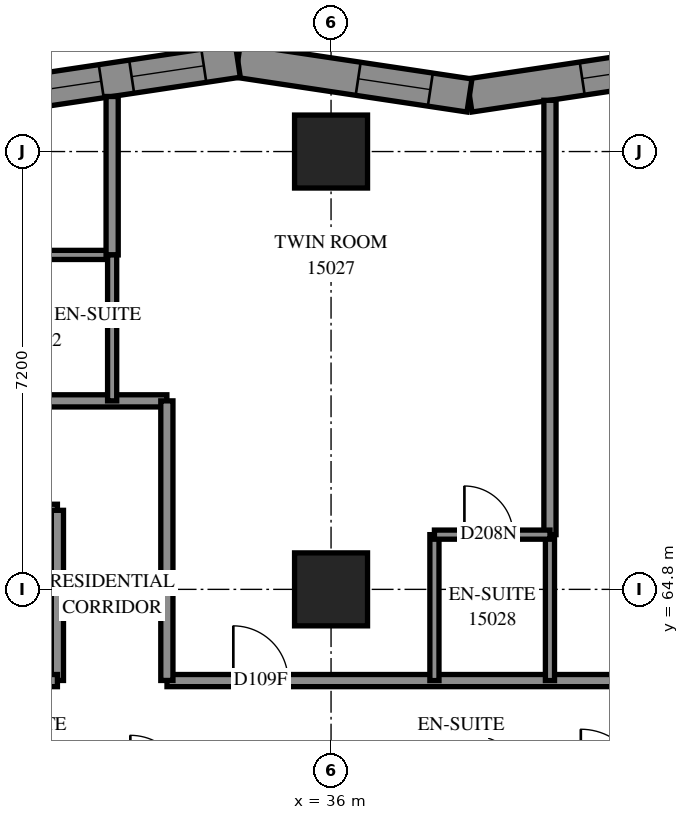
"""IFC4 building model, lengths in metres.
Left out: names, types, materials, properties, quantities, classifications, styles, units other than length and angle.
Written with IfcOpenShell. Run it as: python <this file> out.ifc"""

import sys

from ifc_helpers import new_model, si_unit, direction, frame, frame_2d, origin, origin_2d, place, context, subcontext, project, spatial, polyline, rectangle, outline, extrude, element, fill, save


model = new_model("IFC4")
c1 = context("Model", 3, precision=1e-05, world=origin(), true_north=direction((0.0, 1.0)))
c2 = subcontext(c1, "Body", "Model", "MODEL_VIEW")
j1 = project(units=[si_unit("LENGTHUNIT", "METRE"), si_unit("PLANEANGLEUNIT", "RADIAN")], contexts=[c1])
p1 = place(None, origin())
s1 = spatial("IfcSite", under=j1, at=p1, CompositionType="ELEMENT")
p2 = place(p1, origin())
s2 = spatial("IfcBuilding", under=s1, at=p2, CompositionType="ELEMENT")
p3 = place(p2, frame((0.0, 0.0, 57.6)))
s3 = spatial("IfcBuildingStorey", under=s2, at=p3, CompositionType="ELEMENT", Elevation=57.6)
for number, where, z_axis, x_axis in (
    (1, (36.0, 64.8, 0.0), (0.0, 0.0, 1.0), (1.0, 0.0, 0.0)),
    (2, (36.0, 72.0, 0.0), (0.0, 0.0, 1.0), (1.0, 0.0, 0.0)),
):
    element("IfcColumn", number, at=place(p3, frame(where, z_axis=z_axis, x_axis=x_axis)), inside=s3, PredefinedType="COLUMN", context=c2, shape_type="SweptSolid", body=[
        extrude(rectangle(XDim=1.2, YDim=1.2, at=origin_2d()), origin(), (0.0, 0.0, 1.0), 3.1),
    ])
p4 = place(p3, frame((42.086, 73.494, 0.0), z_axis=(0.0, 0.0, 1.0), x_axis=(-0.9889155896, -0.1484788086, 0.0)))
e3 = element("IfcWall", 3, at=p4, inside=s3, PredefinedType="SOLIDWALL", context=c2, shape_type="SweptSolid", body=[
    extrude(outline(polyline([(-0.041, -0.275), (3.811, -0.275), (3.894, 0.275), (0.041, 0.275), (-0.041, -0.275)])), origin(), (0.0, 0.0, 1.0), 3.1),
])
p5 = place(p4, frame((0.778, 0.0, 0.5)))
e4 = element("IfcOpeningElement", 4, at=p5, cuts=e3, PredefinedType="OPENING", context=c2, shape_type="SweptSolid", body=[
    extrude(rectangle(XDim=1.2, YDim=2.45, at=frame_2d((0.6, 1.225))), frame((0.0, 0.285, 0.0), z_axis=(0.0, -1.0, 0.0), x_axis=(1.0, 0.0, 0.0)), (0.0, 0.0, 1.0), 0.57),
])
p6 = place(p3, frame((38.276, 72.922, 0.0), z_axis=(0.0, 0.0, 1.0), x_axis=(-0.9889155896, 0.1484788086, 0.0)))
e5 = element("IfcWall", 5, at=p6, inside=s3, PredefinedType="SOLIDWALL", context=c2, shape_type="SweptSolid", body=[
    extrude(outline(polyline([(0.041, -0.275), (3.894, -0.275), (3.811, 0.275), (-0.041, 0.275), (0.041, -0.275)])), origin(), (0.0, 0.0, 1.0), 3.1),
])
p7 = place(p6, frame((0.651, 0.0, 0.5)))
e6 = element("IfcOpeningElement", 6, at=p7, cuts=e5, PredefinedType="OPENING", context=c2, shape_type="SweptSolid", body=[
    extrude(rectangle(XDim=1.2, YDim=2.45, at=frame_2d((0.6, 1.225))), frame((0.0, 0.285, 0.0), z_axis=(0.0, -1.0, 0.0), x_axis=(1.0, 0.0, 0.0)), (0.0, 0.0, 1.0), 0.57),
])
p8 = place(p3, frame((34.467, 73.494, 0.0), z_axis=(0.0, 0.0, 1.0), x_axis=(-0.9889150173, -0.1484826202, 0.0)))
e7 = element("IfcWall", 7, at=p8, inside=s3, PredefinedType="SOLIDWALL", context=c2, shape_type="SweptSolid", body=[
    extrude(outline(polyline([(-0.041, -0.275), (3.811, -0.275), (3.894, 0.275), (0.041, 0.275), (-0.041, -0.275)])), origin(), (0.0, 0.0, 1.0), 3.1),
])
p9 = place(p8, frame((0.566, 0.0, 0.5)))
e8 = element("IfcOpeningElement", 8, at=p9, cuts=e7, PredefinedType="OPENING", context=c2, shape_type="SweptSolid", body=[
    extrude(rectangle(XDim=1.2, YDim=2.45, at=frame_2d((0.6, 1.225))), frame((0.0, 0.285, 0.0), z_axis=(0.0, -1.0, 0.0), x_axis=(1.0, 0.0, 0.0)), (0.0, 0.0, 1.0), 0.57),
])
p10 = place(p8, frame((2.271, 0.0, 0.5)))
e9 = element("IfcOpeningElement", 9, at=p10, cuts=e7, PredefinedType="OPENING", context=c2, shape_type="SweptSolid", body=[
    extrude(rectangle(XDim=1.2, YDim=2.45, at=frame_2d((0.6, 1.225))), frame((0.0, 0.285, 0.0), z_axis=(0.0, -1.0, 0.0), x_axis=(1.0, 0.0, 0.0)), (0.0, 0.0, 1.0), 0.57),
])
p11 = place(p3, frame((33.302, 63.3, 0.0), z_axis=(0.0, 0.0, 1.0), x_axis=(1.0, 0.0, 0.0)))
e10 = element("IfcWall", 10, at=p11, inside=s3, PredefinedType="PARTITIONING", context=c2, shape_type="SweptSolid", body=[
    extrude(rectangle(XDim=21.798, YDim=0.2, at=frame_2d((10.899, 0.0))), origin(), (0.0, 0.0, 1.0), 3.1),
])
p12 = place(p11, frame((1.091, 0.0, 0.0)))
e11 = element("IfcOpeningElement", 11, at=p12, cuts=e10, PredefinedType="OPENING", context=c2, shape_type="SweptSolid", body=[
    extrude(rectangle(XDim=0.9, YDim=2.1, at=frame_2d((0.45, 1.05))), frame((0.0, 0.11, 0.0), z_axis=(0.0, -1.0, 0.0), x_axis=(1.0, 0.0, 0.0)), (0.0, 0.0, 1.0), 0.22),
])
p13 = place(p11, frame((8.248, 0.0, 0.0)))
e12 = element("IfcOpeningElement", 12, at=p13, cuts=e10, PredefinedType="OPENING", context=c2, shape_type="SweptSolid", body=[
    extrude(rectangle(XDim=0.9, YDim=2.1, at=frame_2d((0.45, 1.05))), frame((0.0, 0.11, 0.0), z_axis=(0.0, -1.0, 0.0), x_axis=(1.0, 0.0, 0.0)), (0.0, 0.0, 1.0), 0.22),
])
p14 = place(p11, frame((15.448, 0.0, 0.0)))
e13 = element("IfcOpeningElement", 13, at=p14, cuts=e10, PredefinedType="OPENING", context=c2, shape_type="SweptSolid", body=[
    extrude(rectangle(XDim=0.9, YDim=2.1, at=frame_2d((0.45, 1.05))), frame((0.0, 0.11, 0.0), z_axis=(0.0, -1.0, 0.0), x_axis=(1.0, 0.0, 0.0)), (0.0, 0.0, 1.0), 0.22),
])
p15 = place(p3, frame((21.602, 67.9, 0.0), z_axis=(0.0, 0.0, 1.0), x_axis=(1.0, 0.0, 0.0)))
e14 = element("IfcWall", 14, at=p15, inside=s3, PredefinedType="PARTITIONING", context=c2, shape_type="SweptSolid", body=[
    extrude(rectangle(XDim=11.698, YDim=0.2, at=frame_2d((5.849, 0.0))), origin(), (0.0, 0.0, 1.0), 3.1),
])
p16 = place(p15, frame((5.955, 0.0, 0.0)))
e15 = element("IfcOpeningElement", 15, at=p16, cuts=e14, PredefinedType="OPENING", context=c2, shape_type="SweptSolid", body=[
    extrude(rectangle(XDim=0.9, YDim=2.1, at=frame_2d((0.45, 1.05))), frame((0.0, 0.11, 0.0), z_axis=(0.0, -1.0, 0.0), x_axis=(1.0, 0.0, 0.0)), (0.0, 0.0, 1.0), 0.22),
])
p17 = place(p3, frame((21.6, 66.1, 0.0), z_axis=(0.0, 0.0, 1.0), x_axis=(1.0, 0.0, 0.0)))
e16 = element("IfcWall", 16, at=p17, inside=s3, PredefinedType="PARTITIONING", context=c2, shape_type="SweptSolid", body=[
    extrude(rectangle(XDim=9.9, YDim=0.2, at=frame_2d((4.95, 0.0))), origin(), (0.0, 0.0, 1.0), 3.1),
])
p18 = place(p17, frame((5.314, 0.0, 0.0)))
e17 = element("IfcOpeningElement", 17, at=p18, cuts=e16, PredefinedType="OPENING", context=c2, shape_type="SweptSolid", body=[
    extrude(rectangle(XDim=1.0, YDim=2.1, at=frame_2d((0.5, 1.05))), frame((0.0, 0.11, 0.0), z_axis=(0.0, -1.0, 0.0), x_axis=(1.0, 0.0, 0.0)), (0.0, 0.0, 1.0), 0.22),
])
p19 = place(p3, frame((39.6, 65.7, 0.0), z_axis=(0.0, 0.0, 1.0), x_axis=(0.0, 1.0, 0.0)))
e18 = element("IfcWall", 18, at=p19, inside=s3, PredefinedType="PARTITIONING", context=c2, shape_type="SweptSolid", body=[
    extrude(rectangle(XDim=7.143, YDim=0.2, at=frame_2d((3.571, 0.0))), origin(), (0.0, 0.0, 1.0), 3.1),
])
p20 = place(p3, frame((33.3, 63.302, 0.0), z_axis=(0.0, 0.0, 1.0), x_axis=(0.0, 1.0, 0.0)))
e19 = element("IfcWall", 19, at=p20, inside=s3, PredefinedType="PARTITIONING", context=c2, shape_type="SweptSolid", body=[
    extrude(rectangle(XDim=4.598, YDim=0.2, at=frame_2d((2.299, 0.0))), origin(), (0.0, 0.0, 1.0), 3.1),
])
p21 = place(p3, frame((29.2, 70.3, 0.0), z_axis=(0.0, 0.0, 1.0), x_axis=(1.0, 0.0, 0.0)))
e20 = element("IfcWall", 20, at=p21, inside=s3, PredefinedType="PARTITIONING", context=c2, shape_type="SweptSolid", body=[
    extrude(rectangle(XDim=3.2, YDim=0.15, at=frame_2d((1.6, 0.0))), origin(), (0.0, 0.0, 1.0), 3.1),
])
p22 = place(p21, frame((1.204, 0.0, 0.0)))
e21 = element("IfcOpeningElement", 21, at=p22, cuts=e20, PredefinedType="OPENING", context=c2, shape_type="SweptSolid", body=[
    extrude(rectangle(XDim=0.8, YDim=2.1, at=frame_2d((0.4, 1.05))), frame((0.0, 0.085, 0.0), z_axis=(0.0, -1.0, 0.0), x_axis=(1.0, 0.0, 0.0)), (0.0, 0.0, 1.0), 0.17),
])
p23 = place(p3, frame((31.5, 63.302, 0.0), z_axis=(0.0, 0.0, 1.0), x_axis=(0.0, 1.0, 0.0)))
e22 = element("IfcWall", 22, at=p23, inside=s3, PredefinedType="PARTITIONING", context=c2, shape_type="SweptSolid", body=[
    extrude(rectangle(XDim=2.798, YDim=0.2, at=frame_2d((1.399, 0.0))), origin(), (0.0, 0.0, 1.0), 3.1),
])
p24 = place(p3, frame((28.802, 63.3, 0.0), z_axis=(0.0, 0.0, 1.0), x_axis=(1.0, 0.0, 0.0)))
e23 = element("IfcWall", 23, at=p24, inside=s3, PredefinedType="PARTITIONING", context=c2, shape_type="SweptSolid", body=[
    extrude(rectangle(XDim=2.698, YDim=0.2, at=frame_2d((1.349, 0.0))), origin(), (0.0, 0.0, 1.0), 3.1),
])
p25 = place(p3, frame((32.4, 70.3, 0.0), z_axis=(0.0, 0.0, 1.0), x_axis=(0.0, 1.0, 0.0)))
e24 = element("IfcWall", 24, at=p25, inside=s3, PredefinedType="PARTITIONING", context=c2, shape_type="SweptSolid", body=[
    extrude(rectangle(XDim=2.606, YDim=0.2, at=frame_2d((1.303, 0.0))), origin(), (0.0, 0.0, 1.0), 3.1),
])
for number, where, z_axis, x_axis in (
    (25, (37.7, 63.3, 0.0), (0.0, 0.0, 1.0), (0.0, 1.0, 0.0)),
    (26, (39.6, 63.3, 0.0), (0.0, 0.0, 1.0), (0.0, 1.0, 0.0)),
    (27, (32.4, 67.9, 0.0), (0.0, 0.0, 1.0), (0.0, 1.0, 0.0)),
):
    element("IfcWall", number, at=place(p3, frame(where, z_axis=z_axis, x_axis=x_axis)), inside=s3, PredefinedType="PARTITIONING", context=c2, shape_type="SweptSolid", body=[
        extrude(rectangle(XDim=2.4, YDim=0.15, at=frame_2d((1.2, 0.0))), origin(), (0.0, 0.0, 1.0), 3.1),
    ])
p26 = place(p3, frame((37.7, 65.7, 0.0), z_axis=(0.0, 0.0, 1.0), x_axis=(1.0, 0.0, 0.0)))
e28 = element("IfcWall", 28, at=p26, inside=s3, PredefinedType="PARTITIONING", context=c2, shape_type="SweptSolid", body=[
    extrude(rectangle(XDim=1.9, YDim=0.15, at=frame_2d((0.95, 0.0))), origin(), (0.0, 0.0, 1.0), 3.1),
])
p27 = place(p26, frame((0.493, 0.0, 0.0)))
e29 = element("IfcOpeningElement", 29, at=p27, cuts=e28, PredefinedType="OPENING", context=c2, shape_type="SweptSolid", body=[
    extrude(rectangle(XDim=0.8, YDim=2.1, at=frame_2d((0.4, 1.05))), frame((0.0, 0.085, 0.0), z_axis=(0.0, -1.0, 0.0), x_axis=(1.0, 0.0, 0.0)), (0.0, 0.0, 1.0), 0.17),
])
p28 = place(p5, origin())
e30 = element("IfcWindow", 30, at=p28, inside=s3, PartitioningType="SINGLE_PANEL", PredefinedType="WINDOW", context=c2, shape_type="SweptSolid", body=[
    extrude(rectangle(XDim=1.2, YDim=2.45, at=frame_2d((0.6, 1.225))), frame((0.0, 0.155, 0.0), z_axis=(0.0, -1.0, 0.0), x_axis=(1.0, 0.0, 0.0)), (0.0, 0.0, 1.0), 0.06),
])
fill(e4, e30)
p29 = place(p7, origin())
e31 = element("IfcWindow", 31, at=p29, inside=s3, PartitioningType="SINGLE_PANEL", PredefinedType="WINDOW", context=c2, shape_type="SweptSolid", body=[
    extrude(rectangle(XDim=1.2, YDim=2.45, at=frame_2d((0.6, 1.225))), frame((0.0, 0.155, 0.0), z_axis=(0.0, -1.0, 0.0), x_axis=(1.0, 0.0, 0.0)), (0.0, 0.0, 1.0), 0.06),
])
fill(e6, e31)
p30 = place(p9, origin())
e32 = element("IfcWindow", 32, at=p30, inside=s3, PartitioningType="SINGLE_PANEL", PredefinedType="WINDOW", context=c2, shape_type="SweptSolid", body=[
    extrude(rectangle(XDim=1.2, YDim=2.45, at=frame_2d((0.6, 1.225))), frame((0.0, 0.155, 0.0), z_axis=(0.0, -1.0, 0.0), x_axis=(1.0, 0.0, 0.0)), (0.0, 0.0, 1.0), 0.06),
])
fill(e8, e32)
p31 = place(p10, origin())
e33 = element("IfcWindow", 33, at=p31, inside=s3, PartitioningType="SINGLE_PANEL", PredefinedType="WINDOW", context=c2, shape_type="SweptSolid", body=[
    extrude(rectangle(XDim=1.2, YDim=2.45, at=frame_2d((0.6, 1.225))), frame((0.0, 0.155, 0.0), z_axis=(0.0, -1.0, 0.0), x_axis=(1.0, 0.0, 0.0)), (0.0, 0.0, 1.0), 0.06),
])
fill(e9, e33)
p32 = place(p12, origin())
e34 = element("IfcDoor", 34, at=p32, inside=s3, OperationType="SINGLE_SWING_LEFT", PredefinedType="DOOR", context=c2, shape_type="SweptSolid", body=[
    extrude(rectangle(XDim=0.9, YDim=2.1, at=frame_2d((0.45, 1.05))), frame((0.0, 0.025, 0.0), z_axis=(0.0, -1.0, 0.0), x_axis=(1.0, 0.0, 0.0)), (0.0, 0.0, 1.0), 0.05),
])
fill(e11, e34)
p33 = place(p27, origin())
e35 = element("IfcDoor", 35, at=p33, inside=s3, OperationType="SINGLE_SWING_RIGHT", PredefinedType="DOOR", context=c2, shape_type="SweptSolid", body=[
    extrude(rectangle(XDim=0.8, YDim=2.1, at=frame_2d((0.4, 1.05))), frame((0.0, 0.025, 0.0), z_axis=(0.0, -1.0, 0.0), x_axis=(1.0, 0.0, 0.0)), (0.0, 0.0, 1.0), 0.05),
])
fill(e29, e35)
save(model, sys.argv[1])
